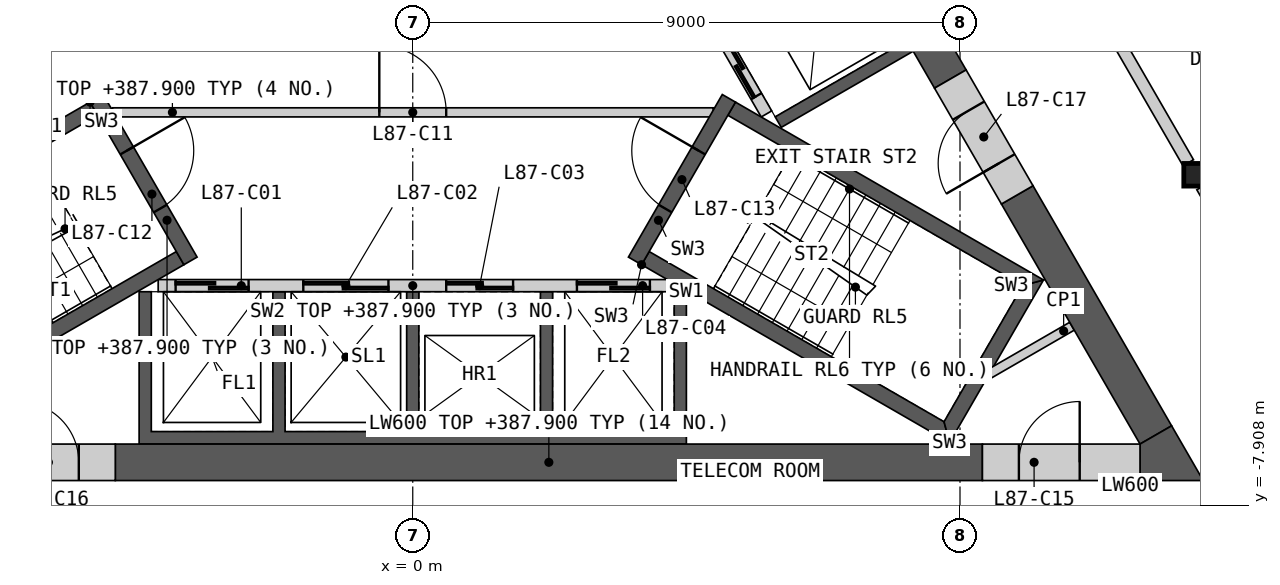
"""IFC4 building model, lengths in metres.
Left out: names, types, materials, properties, quantities, classifications, styles, units other than length and angle.
Written with IfcOpenShell. Run it as: python <this file> out.ifc"""

import sys

from ifc_helpers import new_model, si_unit, direction, frame, frame_2d, origin, origin_2d, place, context, subcontext, project, spatial, polyline, rectangle, i_section, outline, extrude, element, fill, save


model = new_model("IFC4")
c1 = context("Model", 3, precision=1e-05, world=origin(), true_north=direction((0.0, 1.0)))
c2 = subcontext(c1, "Body", "Model", "MODEL_VIEW")
j1 = project(units=[si_unit("LENGTHUNIT", "METRE"), si_unit("PLANEANGLEUNIT", "RADIAN")], contexts=[c1])
p1 = place(None, origin())
s1 = spatial("IfcSite", under=j1, at=p1, CompositionType="ELEMENT")
p2 = place(p1, origin())
s2 = spatial("IfcBuilding", under=s1, at=p2, CompositionType="ELEMENT")
p3 = place(p2, frame((0.0, 0.0, 384.8)))
s3 = spatial("IfcBuildingStorey", under=s2, at=p3, CompositionType="ELEMENT", Elevation=384.8)
p4 = place(p3, frame((12.868, -2.476, 0.0), z_axis=(0.0, 0.0, 1.0), x_axis=(1.0, 0.0, 0.0)))
e1 = element("IfcColumn", 1, at=p4, inside=s3, PredefinedType="COLUMN", context=c2, shape_type="SweptSolid", body=[
    extrude(i_section(OverallWidth=0.374, OverallDepth=0.372, WebThickness=0.016, FlangeThickness=0.026, at=origin_2d()), origin(), (0.0, 0.0, 1.0), 3.4),
])
p5 = place(p3, origin())
e2 = element("IfcWall", 2, at=p5, inside=s3, PredefinedType="SHEAR", context=c2, shape_type="SweptSolid", body=[
    extrude(outline(polyline([(4.5, -4.4), (4.5, -6.906), (-4.5, -6.906), (-4.5, -4.4), (-4.3, -4.4), (-4.3, -6.7), (-2.3, -6.7), (-2.3, -4.4), (-2.1, -4.4), (-2.1, -6.7), (-0.1, -6.7), (-0.1, -4.4), (0.1, -4.4), (0.1, -6.7), (2.1, -6.7), (2.1, -4.4), (2.3, -4.4), (2.3, -6.7), (4.3, -6.7), (4.3, -4.4), (4.5, -4.4)])), origin(), (0.0, 0.0, 1.0), 3.1),
])
p6 = place(p3, frame((-4.187, -4.3, 0.0), z_axis=(0.0, 0.0, 1.0), x_axis=(1.0, 0.0, 0.0)))
e3 = element("IfcWall", 3, at=p6, inside=s3, PredefinedType="SOLIDWALL", context=c2, shape_type="SweptSolid", body=[
    extrude(rectangle(XDim=8.373, YDim=0.2, at=frame_2d((4.187, 0.0))), origin(), (0.0, 0.0, 1.0), 3.1),
])
p7 = place(p6, frame((0.287, 0.0, 0.0)))
e4 = element("IfcOpeningElement", 4, at=p7, cuts=e3, PredefinedType="OPENING", context=c2, shape_type="SweptSolid", body=[
    extrude(rectangle(XDim=1.2, YDim=2.1, at=frame_2d((0.6, 1.05))), frame((0.0, 0.11, 0.0), z_axis=(0.0, -1.0, 0.0), x_axis=(1.0, 0.0, 0.0)), (0.0, 0.0, 1.0), 0.22),
])
p8 = place(p6, frame((2.387, 0.0, 0.0)))
e5 = element("IfcOpeningElement", 5, at=p8, cuts=e3, PredefinedType="OPENING", context=c2, shape_type="SweptSolid", body=[
    extrude(rectangle(XDim=1.4, YDim=2.1, at=frame_2d((0.7, 1.05))), frame((0.0, 0.11, 0.0), z_axis=(0.0, -1.0, 0.0), x_axis=(1.0, 0.0, 0.0)), (0.0, 0.0, 1.0), 0.22),
])
p9 = place(p6, frame((4.737, 0.0, 0.0)))
e6 = element("IfcOpeningElement", 6, at=p9, cuts=e3, PredefinedType="OPENING", context=c2, shape_type="SweptSolid", body=[
    extrude(rectangle(XDim=1.1, YDim=2.1, at=frame_2d((0.55, 1.05))), frame((0.0, 0.11, 0.0), z_axis=(0.0, -1.0, 0.0), x_axis=(1.0, 0.0, 0.0)), (0.0, 0.0, 1.0), 0.22),
])
p10 = place(p6, frame((6.887, 0.0, 0.0)))
e7 = element("IfcOpeningElement", 7, at=p10, cuts=e3, PredefinedType="OPENING", context=c2, shape_type="SweptSolid", body=[
    extrude(rectangle(XDim=1.2, YDim=2.1, at=frame_2d((0.6, 1.05))), frame((0.0, 0.11, 0.0), z_axis=(0.0, -1.0, 0.0), x_axis=(1.0, 0.0, 0.0)), (0.0, 0.0, 1.0), 0.22),
])
p11 = place(p3, origin())
e8 = element("IfcWall", 8, at=p11, inside=s3, PredefinedType="SHEAR", context=c2, shape_type="SweptSolid", body=[
    extrude(outline(polyline([(1.561, 6.097), (3.731, 7.35), (8.231, -0.444), (6.061, -1.697), (5.96, -1.524), (7.952, -0.374), (6.952, 1.358), (4.96, 0.208), (4.861, 0.381), (6.852, 1.531), (5.852, 3.263), (3.861, 2.113), (3.76, 2.287), (5.752, 3.437), (4.752, 5.169), (2.76, 4.019), (2.66, 4.192), (4.652, 5.342), (3.652, 7.074), (1.66, 5.924), (1.561, 6.097)])), origin(), (0.0, 0.0, 1.0), 3.1),
])
p12 = place(p3, frame((5.817, -1.476, 0.0), z_axis=(0.0, 0.0, 1.0), x_axis=(-0.500002616675, 0.866023893041, 0.0)))
e9 = element("IfcWall", 9, at=p12, inside=s3, PredefinedType="SOLIDWALL", context=c2, shape_type="SweptSolid", body=[
    extrude(rectangle(XDim=8.373, YDim=0.2, at=frame_2d((4.187, 0.0))), origin(), (0.0, 0.0, 1.0), 3.1),
])
p13 = place(p12, frame((0.337, 0.0, 0.0)))
e10 = element("IfcOpeningElement", 10, at=p13, cuts=e9, PredefinedType="OPENING", context=c2, shape_type="SweptSolid", body=[
    extrude(rectangle(XDim=1.1, YDim=2.1, at=frame_2d((0.55, 1.05))), frame((0.0, 0.11, 0.0), z_axis=(0.0, -1.0, 0.0), x_axis=(1.0, 0.0, 0.0)), (0.0, 0.0, 1.0), 0.22),
])
p14 = place(p12, frame((2.537, 0.0, 0.0)))
e11 = element("IfcOpeningElement", 11, at=p14, cuts=e9, PredefinedType="OPENING", context=c2, shape_type="SweptSolid", body=[
    extrude(rectangle(XDim=1.1, YDim=2.1, at=frame_2d((0.55, 1.05))), frame((0.0, 0.11, 0.0), z_axis=(0.0, -1.0, 0.0), x_axis=(1.0, 0.0, 0.0)), (0.0, 0.0, 1.0), 0.22),
])
p15 = place(p12, frame((4.737, 0.0, 0.0)))
e12 = element("IfcOpeningElement", 12, at=p15, cuts=e9, PredefinedType="OPENING", context=c2, shape_type="SweptSolid", body=[
    extrude(rectangle(XDim=1.1, YDim=2.1, at=frame_2d((0.55, 1.05))), frame((0.0, 0.11, 0.0), z_axis=(0.0, -1.0, 0.0), x_axis=(1.0, 0.0, 0.0)), (0.0, 0.0, 1.0), 0.22),
])
p16 = place(p12, frame((7.037, 0.0, 0.0)))
e13 = element("IfcOpeningElement", 13, at=p16, cuts=e9, PredefinedType="OPENING", context=c2, shape_type="SweptSolid", body=[
    extrude(rectangle(XDim=0.9, YDim=2.1, at=frame_2d((0.45, 1.05))), frame((0.0, 0.11, 0.0), z_axis=(0.0, -1.0, 0.0), x_axis=(1.0, 0.0, 0.0)), (0.0, 0.0, 1.0), 0.22),
])
p17 = place(p3, frame((-4.941, -1.45, 0.0), z_axis=(0.0, 0.0, 1.0), x_axis=(1.0, 0.0, 0.0)))
e14 = element("IfcWall", 14, at=p17, inside=s3, PredefinedType="PARTITIONING", context=c2, shape_type="SweptSolid", body=[
    extrude(rectangle(XDim=9.882, YDim=0.15, at=frame_2d((4.941, 0.0))), origin(), (0.0, 0.0, 1.0), 3.1),
])
p18 = place(p17, frame((4.391, 0.0, 0.0)))
e15 = element("IfcOpeningElement", 15, at=p18, cuts=e14, PredefinedType="OPENING", context=c2, shape_type="SweptSolid", body=[
    extrude(rectangle(XDim=1.1, YDim=2.1, at=frame_2d((0.55, 1.05))), frame((0.0, 0.085, 0.0), z_axis=(0.0, -1.0, 0.0), x_axis=(1.0, 0.0, 0.0)), (0.0, 0.0, 1.0), 0.17),
])
p19 = place(p3, origin())
e16 = element("IfcWall", 16, at=p19, inside=s3, PredefinedType="SHEAR", context=c2, shape_type="SweptSolid", body=[
    extrude(outline(polyline([(-5.307, -1.281), (-10.374, -4.206), (-10.032, -4.298), (-5.182, -1.498), (-5.307, -1.281)])), origin(), (0.0, 0.0, 1.0), 3.1),
])
p20 = place(p3, origin())
e17 = element("IfcWall", 17, at=p20, inside=s3, PredefinedType="SHEAR", context=c2, shape_type="SweptSolid", body=[
    extrude(outline(polyline([(-8.738, -6.539), (-8.83, -6.881), (-3.763, -3.956), (-3.888, -3.739), (-8.738, -6.539)])), origin(), (0.0, 0.0, 1.0), 3.1),
])
p21 = place(p3, frame((-5.199, -1.219, 0.0), z_axis=(0.0, 0.0, 1.0), x_axis=(0.499982516597, -0.866035497597, 0.0)))
e18 = element("IfcWall", 18, at=p21, inside=s3, PredefinedType="SHEAR", context=c2, shape_type="SweptSolid", body=[
    extrude(rectangle(XDim=3.088, YDim=0.25, at=frame_2d((1.544, 0.0))), origin(), (0.0, 0.0, 1.0), 3.1),
])
p22 = place(p21, frame((0.994, 0.0, 0.0)))
e19 = element("IfcOpeningElement", 19, at=p22, cuts=e18, PredefinedType="OPENING", context=c2, shape_type="SweptSolid", body=[
    extrude(rectangle(XDim=1.1, YDim=2.1, at=frame_2d((0.55, 1.05))), frame((0.0, 0.135, 0.0), z_axis=(0.0, -1.0, 0.0), x_axis=(1.0, 0.0, 0.0)), (0.0, 0.0, 1.0), 0.27),
])
p23 = place(p3, origin())
e20 = element("IfcWall", 20, at=p23, inside=s3, PredefinedType="SHEAR", context=c2, shape_type="SweptSolid", body=[
    extrude(outline(polyline([(3.763, -3.956), (8.83, -6.881), (8.738, -6.539), (3.888, -3.739), (3.763, -3.956)])), origin(), (0.0, 0.0, 1.0), 3.1),
])
p24 = place(p3, origin())
e21 = element("IfcWall", 21, at=p24, inside=s3, PredefinedType="SHEAR", context=c2, shape_type="SweptSolid", body=[
    extrude(outline(polyline([(8.83, -6.881), (10.374, -4.206), (10.032, -4.298), (8.738, -6.539), (8.83, -6.881)])), origin(), (0.0, 0.0, 1.0), 3.1),
])
p25 = place(p3, origin())
e22 = element("IfcWall", 22, at=p25, inside=s3, PredefinedType="SHEAR", context=c2, shape_type="SweptSolid", body=[
    extrude(outline(polyline([(10.032, -4.298), (10.374, -4.206), (5.307, -1.281), (5.182, -1.498), (10.032, -4.298)])), origin(), (0.0, 0.0, 1.0), 3.1),
])
p26 = place(p3, frame((3.655, -3.893, 0.0), z_axis=(0.0, 0.0, 1.0), x_axis=(0.499982516597, 0.866035497597, 0.0)))
e23 = element("IfcWall", 23, at=p26, inside=s3, PredefinedType="SHEAR", context=c2, shape_type="SweptSolid", body=[
    extrude(rectangle(XDim=3.088, YDim=0.25, at=frame_2d((1.544, 0.0))), origin(), (0.0, 0.0, 1.0), 3.1),
])
p27 = place(p26, frame((0.994, 0.0, 0.0)))
e24 = element("IfcOpeningElement", 24, at=p27, cuts=e23, PredefinedType="OPENING", context=c2, shape_type="SweptSolid", body=[
    extrude(rectangle(XDim=1.1, YDim=2.1, at=frame_2d((0.55, 1.05))), frame((0.0, 0.135, 0.0), z_axis=(0.0, -1.0, 0.0), x_axis=(1.0, 0.0, 0.0)), (0.0, 0.0, 1.0), 0.27),
])
p28 = place(p3, frame((10.842, -4.967, 0.0), z_axis=(0.0, 0.0, 1.0), x_axis=(-0.866098216386, -0.499873863663, 0.0)))
e25 = element("IfcWall", 25, at=p28, inside=s3, PredefinedType="PARTITIONING", context=c2, shape_type="SweptSolid", body=[
    extrude(rectangle(XDim=1.582, YDim=0.15, at=frame_2d((0.791, 0.0))), origin(), (0.0, 0.0, 1.0), 3.1),
])
p29 = place(p3, frame((-4.892, -7.206, 0.0), z_axis=(0.0, 0.0, 1.0), x_axis=(1.0, 0.0, 0.0)))
e26 = element("IfcWall", 26, at=p29, inside=s3, PredefinedType="SHEAR", context=c2, shape_type="SweptSolid", body=[
    extrude(rectangle(XDim=14.261, YDim=0.6, at=frame_2d((7.13, 0.0))), origin(), (0.0, 0.0, 1.0), 3.1),
])
p30 = place(p3, frame((8.841, -0.902, 0.0), z_axis=(0.0, 0.0, 1.0), x_axis=(-0.499995618375, 0.866027933502, 0.0)))
e27 = element("IfcWall", 27, at=p30, inside=s3, PredefinedType="SHEAR", context=c2, shape_type="SweptSolid", body=[
    extrude(rectangle(XDim=14.571, YDim=0.6, at=frame_2d((7.285, 0.0))), origin(), (0.0, 0.0, 1.0), 3.1),
])
p31 = place(p3, frame((12.221, -6.756, 0.0), z_axis=(0.0, 0.0, 1.0), x_axis=(-0.500020646047, 0.866013483456, 0.0)))
e28 = element("IfcWall", 28, at=p31, inside=s3, PredefinedType="SHEAR", context=c2, shape_type="SweptSolid", body=[
    extrude(rectangle(XDim=4.559, YDim=0.6, at=frame_2d((2.28, 0.0))), origin(), (0.0, 0.0, 1.0), 3.1),
])
p32 = place(p3, origin())
e29 = element("IfcWall", 29, at=p32, inside=s3, PredefinedType="SHEAR", context=c2, shape_type="SweptSolid", body=[
    extrude(outline(polyline([(11.961, -7.506), (11.961, -6.906), (12.48, -6.606), (13.0, -7.506), (11.961, -7.506)])), origin(), (0.0, 0.0, 1.0), 3.1),
])
p33 = place(p3, frame((9.369, -7.206, 0.0), z_axis=(0.0, 0.0, 1.0), x_axis=(1.0, 0.0, 0.0)))
e30 = element("IfcWall", 30, at=p33, inside=s3, PredefinedType="SHEAR", context=c2, shape_type="SweptSolid", body=[
    extrude(rectangle(XDim=2.592, YDim=0.6, at=frame_2d((1.296, 0.0))), origin(), (0.0, 0.0, 1.0), 3.1),
])
p34 = place(p33, frame((0.6, 0.0, 0.0)))
e31 = element("IfcOpeningElement", 31, at=p34, cuts=e30, PredefinedType="OPENING", context=c2, shape_type="SweptSolid", body=[
    extrude(rectangle(XDim=1.0, YDim=2.1, at=frame_2d((0.5, 1.05))), frame((0.0, 0.31, 0.0), z_axis=(0.0, -1.0, 0.0), x_axis=(1.0, 0.0, 0.0)), (0.0, 0.0, 1.0), 0.62),
])
p35 = place(p3, frame((-7.092, -7.206, 0.0), z_axis=(0.0, 0.0, 1.0), x_axis=(1.0, 0.0, 0.0)))
e32 = element("IfcWall", 32, at=p35, inside=s3, PredefinedType="SHEAR", context=c2, shape_type="SweptSolid", body=[
    extrude(rectangle(XDim=2.2, YDim=0.6, at=frame_2d((1.1, 0.0))), origin(), (0.0, 0.0, 1.0), 3.1),
])
p36 = place(p35, frame((0.6, 0.0, 0.0)))
e33 = element("IfcOpeningElement", 33, at=p36, cuts=e32, PredefinedType="OPENING", context=c2, shape_type="SweptSolid", body=[
    extrude(rectangle(XDim=1.0, YDim=2.1, at=frame_2d((0.5, 1.05))), frame((0.0, 0.31, 0.0), z_axis=(0.0, -1.0, 0.0), x_axis=(1.0, 0.0, 0.0)), (0.0, 0.0, 1.0), 0.62),
])
p37 = place(p3, frame((9.941, -2.807, 0.0), z_axis=(0.0, 0.0, 1.0), x_axis=(-0.499994660107, 0.866028486751, 0.0)))
e34 = element("IfcWall", 34, at=p37, inside=s3, PredefinedType="SHEAR", context=c2, shape_type="SweptSolid", body=[
    extrude(rectangle(XDim=2.2, YDim=0.6, at=frame_2d((1.1, 0.0))), origin(), (0.0, 0.0, 1.0), 3.1),
])
p38 = place(p37, frame((0.6, 0.0, 0.0)))
e35 = element("IfcOpeningElement", 35, at=p38, cuts=e34, PredefinedType="OPENING", context=c2, shape_type="SweptSolid", body=[
    extrude(rectangle(XDim=1.0, YDim=2.1, at=frame_2d((0.5, 1.05))), frame((0.0, 0.31, 0.0), z_axis=(0.0, -1.0, 0.0), x_axis=(1.0, 0.0, 0.0)), (0.0, 0.0, 1.0), 0.62),
])
p39 = place(p3, frame((8.692, 4.756, 0.0), z_axis=(0.0, 0.0, 1.0), x_axis=(0.500001682468, -0.866024432409, 0.0)))
e36 = element("IfcWall", 36, at=p39, inside=s3, PredefinedType="PARTITIONING", context=c2, shape_type="SweptSolid", body=[
    extrude(rectangle(XDim=8.124, YDim=0.2, at=frame_2d((4.062, 0.0))), origin(), (0.0, 0.0, 1.0), 3.1),
])
p40 = place(p39, frame((1.956, 0.0, 0.0)))
e37 = element("IfcOpeningElement", 37, at=p40, cuts=e36, PredefinedType="OPENING", context=c2, shape_type="SweptSolid", body=[
    extrude(rectangle(XDim=1.0, YDim=2.1, at=frame_2d((0.5, 1.05))), frame((0.0, 0.11, 0.0), z_axis=(0.0, -1.0, 0.0), x_axis=(1.0, 0.0, 0.0)), (0.0, 0.0, 1.0), 0.22),
])
p41 = place(p3, frame((12.981, -2.673, 0.0), z_axis=(0.0, 0.0, 1.0), x_axis=(0.499986217557, -0.866033360935, 0.0)))
e38 = element("IfcWall", 38, at=p41, inside=s3, PredefinedType="PARTITIONING", context=c2, shape_type="SweptSolid", body=[
    extrude(rectangle(XDim=4.3, YDim=0.2, at=frame_2d((2.15, 0.0))), origin(), (0.0, 0.0, 1.0), 3.1),
])
p42 = place(p7, origin())
e39 = element("IfcDoor", 39, at=p42, inside=s3, OperationType="SLIDING_TO_LEFT", PredefinedType="DOOR", context=c2, shape_type="SweptSolid", body=[
    extrude(rectangle(XDim=1.2, YDim=2.1, at=frame_2d((0.6, 1.05))), frame((0.0, 0.025, 0.0), z_axis=(0.0, -1.0, 0.0), x_axis=(1.0, 0.0, 0.0)), (0.0, 0.0, 1.0), 0.05),
])
fill(e4, e39)
p43 = place(p8, origin())
e40 = element("IfcDoor", 40, at=p43, inside=s3, OperationType="SLIDING_TO_LEFT", PredefinedType="DOOR", context=c2, shape_type="SweptSolid", body=[
    extrude(rectangle(XDim=1.4, YDim=2.1, at=frame_2d((0.7, 1.05))), frame((0.0, 0.025, 0.0), z_axis=(0.0, -1.0, 0.0), x_axis=(1.0, 0.0, 0.0)), (0.0, 0.0, 1.0), 0.05),
])
fill(e5, e40)
p44 = place(p9, origin())
e41 = element("IfcDoor", 41, at=p44, inside=s3, OperationType="SLIDING_TO_LEFT", PredefinedType="DOOR", context=c2, shape_type="SweptSolid", body=[
    extrude(rectangle(XDim=1.1, YDim=2.1, at=frame_2d((0.55, 1.05))), frame((0.0, 0.025, 0.0), z_axis=(0.0, -1.0, 0.0), x_axis=(1.0, 0.0, 0.0)), (0.0, 0.0, 1.0), 0.05),
])
fill(e6, e41)
p45 = place(p10, origin())
e42 = element("IfcDoor", 42, at=p45, inside=s3, OperationType="SLIDING_TO_LEFT", PredefinedType="DOOR", context=c2, shape_type="SweptSolid", body=[
    extrude(rectangle(XDim=1.2, YDim=2.1, at=frame_2d((0.6, 1.05))), frame((0.0, 0.025, 0.0), z_axis=(0.0, -1.0, 0.0), x_axis=(1.0, 0.0, 0.0)), (0.0, 0.0, 1.0), 0.05),
])
fill(e7, e42)
p46 = place(p13, origin())
e43 = element("IfcDoor", 43, at=p46, inside=s3, OperationType="SLIDING_TO_LEFT", PredefinedType="DOOR", context=c2, shape_type="SweptSolid", body=[
    extrude(rectangle(XDim=1.1, YDim=2.1, at=frame_2d((0.55, 1.05))), frame((0.0, 0.025, 0.0), z_axis=(0.0, -1.0, 0.0), x_axis=(1.0, 0.0, 0.0)), (0.0, 0.0, 1.0), 0.05),
])
fill(e10, e43)
p47 = place(p18, origin())
e44 = element("IfcDoor", 44, at=p47, inside=s3, OperationType="SINGLE_SWING_LEFT", PredefinedType="DOOR", context=c2, shape_type="SweptSolid", body=[
    extrude(rectangle(XDim=1.1, YDim=2.1, at=frame_2d((0.55, 1.05))), frame((0.0, 0.025, 0.0), z_axis=(0.0, -1.0, 0.0), x_axis=(1.0, 0.0, 0.0)), (0.0, 0.0, 1.0), 0.05),
])
fill(e15, e44)
p48 = place(p22, origin())
e45 = element("IfcDoor", 45, at=p48, inside=s3, OperationType="SINGLE_SWING_LEFT", PredefinedType="DOOR", context=c2, shape_type="SweptSolid", body=[
    extrude(rectangle(XDim=1.1, YDim=2.1, at=frame_2d((0.55, 1.05))), frame((0.0, 0.025, 0.0), z_axis=(0.0, -1.0, 0.0), x_axis=(1.0, 0.0, 0.0)), (0.0, 0.0, 1.0), 0.05),
])
fill(e19, e45)
p49 = place(p27, origin())
e46 = element("IfcDoor", 46, at=p49, inside=s3, OperationType="SINGLE_SWING_RIGHT", PredefinedType="DOOR", context=c2, shape_type="SweptSolid", body=[
    extrude(rectangle(XDim=1.1, YDim=2.1, at=frame_2d((0.55, 1.05))), frame((0.0, 0.025, 0.0), z_axis=(0.0, -1.0, 0.0), x_axis=(1.0, 0.0, 0.0)), (0.0, 0.0, 1.0), 0.05),
])
fill(e24, e46)
p50 = place(p34, origin())
e47 = element("IfcDoor", 47, at=p50, inside=s3, OperationType="SINGLE_SWING_RIGHT", PredefinedType="DOOR", context=c2, shape_type="SweptSolid", body=[
    extrude(rectangle(XDim=1.0, YDim=2.1, at=frame_2d((0.5, 1.05))), frame((0.0, 0.055, 0.0), z_axis=(0.0, -1.0, 0.0), x_axis=(1.0, 0.0, 0.0)), (0.0, 0.0, 1.0), 0.05),
])
fill(e31, e47)
p51 = place(p36, origin())
e48 = element("IfcDoor", 48, at=p51, inside=s3, OperationType="SINGLE_SWING_LEFT", PredefinedType="DOOR", context=c2, shape_type="SweptSolid", body=[
    extrude(rectangle(XDim=1.0, YDim=2.1, at=frame_2d((0.5, 1.05))), frame((0.0, 0.055, 0.0), z_axis=(0.0, -1.0, 0.0), x_axis=(1.0, 0.0, 0.0)), (0.0, 0.0, 1.0), 0.05),
])
fill(e33, e48)
p52 = place(p38, origin())
e49 = element("IfcDoor", 49, at=p52, inside=s3, OperationType="SINGLE_SWING_LEFT", PredefinedType="DOOR", context=c2, shape_type="SweptSolid", body=[
    extrude(rectangle(XDim=1.0, YDim=2.1, at=frame_2d((0.5, 1.05))), frame((0.0, 0.055, 0.0), z_axis=(0.0, -1.0, 0.0), x_axis=(1.0, 0.0, 0.0)), (0.0, 0.0, 1.0), 0.05),
])
fill(e35, e49)
save(model, sys.argv[1])
